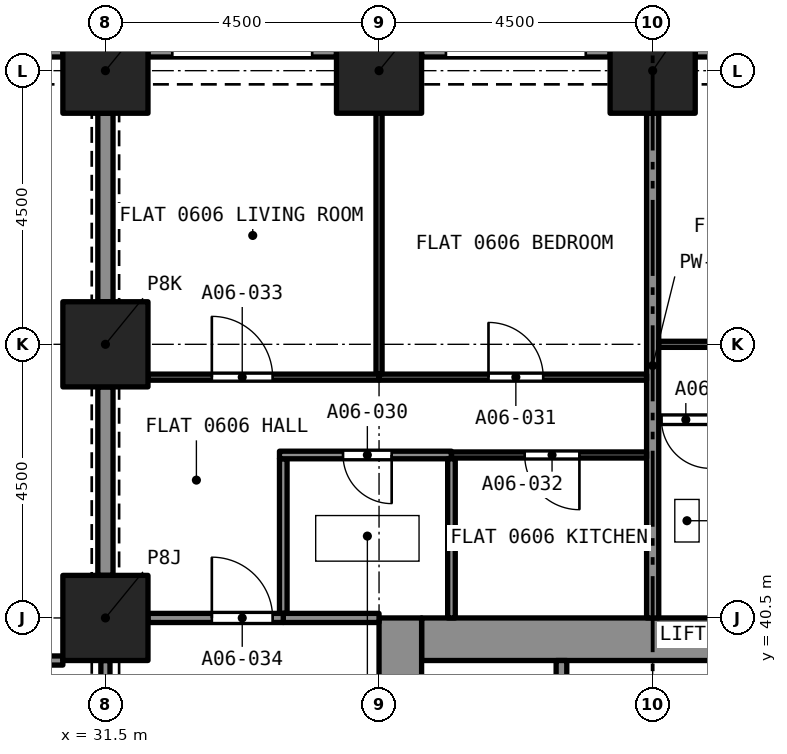
"""IFC4 building model, lengths in metres.
Left out: names, types, materials, properties, quantities, classifications, styles, units other than length and angle.
Written with IfcOpenShell. Run it as: python <this file> out.ifc"""

import sys

from ifc_helpers import new_model, si_unit, direction, frame, frame_2d, origin, origin_2d, place, context, subcontext, project, spatial, rectangle, extrude, element, fill, save


model = new_model("IFC4")
c1 = context("Model", 3, precision=1e-05, world=origin(), true_north=direction((0.0, 1.0)))
c2 = subcontext(c1, "Body", "Model", "MODEL_VIEW")
j1 = project(units=[si_unit("LENGTHUNIT", "METRE"), si_unit("PLANEANGLEUNIT", "RADIAN")], contexts=[c1])
p1 = place(None, origin())
s1 = spatial("IfcSite", under=j1, at=p1, CompositionType="ELEMENT")
p2 = place(p1, origin())
s2 = spatial("IfcBuilding", under=s1, at=p2, CompositionType="ELEMENT")
p3 = place(p2, frame((0.0, 0.0, 30.4)))
s3 = spatial("IfcBuildingStorey", under=s2, at=p3, CompositionType="ELEMENT", Elevation=30.4)
for number, where, z_axis, x_axis in (
    (1, (31.5, 40.5, 0.0), (0.0, 0.0, 1.0), (1.0, 0.0, 0.0)),
    (2, (31.5, 45.0, 0.0), (0.0, 0.0, 1.0), (1.0, 0.0, 0.0)),
    (3, (31.5, 49.5, 0.0), (0.0, 0.0, 1.0), (1.0, 0.0, 0.0)),
    (4, (36.0, 49.5, 0.0), (0.0, 0.0, 1.0), (1.0, 0.0, 0.0)),
    (5, (40.5, 49.5, 0.0), (0.0, 0.0, 1.0), (1.0, 0.0, 0.0)),
):
    element("IfcColumn", number, at=place(p3, frame(where, z_axis=z_axis, x_axis=x_axis)), inside=s3, PredefinedType="COLUMN", context=c2, shape_type="SweptSolid", body=[
        extrude(rectangle(XDim=1.4, YDim=1.4, at=origin_2d()), origin(), (0.0, 0.0, 1.0), 3.2),
    ])
p4 = place(p3, frame((36.7, 40.15, 0.0), z_axis=(0.0, 0.0, 1.0), x_axis=(1.0, 0.0, 0.0)))
e6 = element("IfcWall", 6, at=p4, inside=s3, PredefinedType="SOLIDWALL", context=c2, shape_type="SweptSolid", body=[
    extrude(rectangle(XDim=7.6, YDim=0.7, at=frame_2d((3.8, 0.0))), origin(), (0.0, 0.0, 1.0), 3.2),
])
p5 = place(p3, frame((36.35, 27.0, 0.0), z_axis=(0.0, 0.0, 1.0), x_axis=(0.0, 1.0, 0.0)))
e7 = element("IfcWall", 7, at=p5, inside=s3, PredefinedType="SOLIDWALL", context=c2, shape_type="SweptSolid", body=[
    extrude(rectangle(XDim=13.5, YDim=0.7, at=frame_2d((6.75, 0.0))), origin(), (0.0, 0.0, 1.0), 3.2),
])
p6 = place(p5, frame((8.95, 0.0, 0.0)))
e8 = element("IfcOpeningElement", 8, at=p6, cuts=e7, PredefinedType="OPENING", context=c2, shape_type="SweptSolid", body=[
    extrude(rectangle(XDim=1.2, YDim=2.1, at=frame_2d((0.6, 1.05))), frame((0.0, 0.36, 0.0), z_axis=(0.0, -1.0, 0.0), x_axis=(1.0, 0.0, 0.0)), (0.0, 0.0, 1.0), 0.72),
])
p7 = place(p3, frame((41.2, 49.875, 0.0), z_axis=(0.0, 0.0, 1.0), x_axis=(1.0, 0.0, 0.0)))
e9 = element("IfcWall", 9, at=p7, inside=s3, PredefinedType="SOLIDWALL", context=c2, shape_type="SweptSolid", body=[
    extrude(rectangle(XDim=3.1, YDim=0.3, at=frame_2d((1.55, 0.0))), origin(), (0.0, 0.0, 1.0), 3.2),
])
p8 = place(p7, frame((0.4, 0.0, 0.45)))
e10 = element("IfcOpeningElement", 10, at=p8, cuts=e9, PredefinedType="OPENING", context=c2, shape_type="SweptSolid", body=[
    extrude(rectangle(XDim=2.3, YDim=1.95, at=frame_2d((1.15, 0.975))), frame((0.0, 0.16, 0.0), z_axis=(0.0, -1.0, 0.0), x_axis=(1.0, 0.0, 0.0)), (0.0, 0.0, 1.0), 0.32),
])
p9 = place(p3, frame((36.7, 49.875, 0.0), z_axis=(0.0, 0.0, 1.0), x_axis=(1.0, 0.0, 0.0)))
e11 = element("IfcWall", 11, at=p9, inside=s3, PredefinedType="SOLIDWALL", context=c2, shape_type="SweptSolid", body=[
    extrude(rectangle(XDim=3.1, YDim=0.3, at=frame_2d((1.55, 0.0))), origin(), (0.0, 0.0, 1.0), 3.2),
])
p10 = place(p9, frame((0.4, 0.0, 0.45)))
e12 = element("IfcOpeningElement", 12, at=p10, cuts=e11, PredefinedType="OPENING", context=c2, shape_type="SweptSolid", body=[
    extrude(rectangle(XDim=2.3, YDim=1.95, at=frame_2d((1.15, 0.975))), frame((0.0, 0.16, 0.0), z_axis=(0.0, -1.0, 0.0), x_axis=(1.0, 0.0, 0.0)), (0.0, 0.0, 1.0), 0.32),
])
p11 = place(p3, frame((32.2, 49.875, 0.0), z_axis=(0.0, 0.0, 1.0), x_axis=(1.0, 0.0, 0.0)))
e13 = element("IfcWall", 13, at=p11, inside=s3, PredefinedType="SOLIDWALL", context=c2, shape_type="SweptSolid", body=[
    extrude(rectangle(XDim=3.1, YDim=0.3, at=frame_2d((1.55, 0.0))), origin(), (0.0, 0.0, 1.0), 3.2),
])
p12 = place(p11, frame((0.4, 0.0, 0.45)))
e14 = element("IfcOpeningElement", 14, at=p12, cuts=e13, PredefinedType="OPENING", context=c2, shape_type="SweptSolid", body=[
    extrude(rectangle(XDim=2.3, YDim=1.95, at=frame_2d((1.15, 0.975))), frame((0.0, 0.16, 0.0), z_axis=(0.0, -1.0, 0.0), x_axis=(1.0, 0.0, 0.0)), (0.0, 0.0, 1.0), 0.32),
])
p13 = place(p3, frame((27.7, 49.875, 0.0), z_axis=(0.0, 0.0, 1.0), x_axis=(1.0, 0.0, 0.0)))
e15 = element("IfcWall", 15, at=p13, inside=s3, PredefinedType="SOLIDWALL", context=c2, shape_type="SweptSolid", body=[
    extrude(rectangle(XDim=3.1, YDim=0.3, at=frame_2d((1.55, 0.0))), origin(), (0.0, 0.0, 1.0), 3.2),
])
p14 = place(p13, frame((0.4, 0.0, 0.45)))
e16 = element("IfcOpeningElement", 16, at=p14, cuts=e15, PredefinedType="OPENING", context=c2, shape_type="SweptSolid", body=[
    extrude(rectangle(XDim=2.3, YDim=1.95, at=frame_2d((1.15, 0.975))), frame((0.0, 0.16, 0.0), z_axis=(0.0, -1.0, 0.0), x_axis=(1.0, 0.0, 0.0)), (0.0, 0.0, 1.0), 0.32),
])
p15 = place(p3, frame((41.591, 43.76, 0.0), z_axis=(0.0, 0.0, 1.0), x_axis=(-1.0, 0.0, 0.0)))
e17 = element("IfcWall", 17, at=p15, inside=s3, PredefinedType="PARTITIONING", context=c2, shape_type="SweptSolid", body=[
    extrude(rectangle(XDim=0.991, YDim=0.125, at=frame_2d((0.495, 0.0))), origin(), (0.0, 0.0, 1.0), 2.9),
])
p16 = place(p15, frame((0.146, 0.0, 0.0)))
e18 = element("IfcOpeningElement", 18, at=p16, cuts=e17, PredefinedType="OPENING", context=c2, shape_type="SweptSolid", body=[
    extrude(rectangle(XDim=0.8, YDim=2.1, at=frame_2d((0.4, 1.05))), frame((0.0, 0.073, 0.0), z_axis=(0.0, -1.0, 0.0), x_axis=(1.0, 0.0, 0.0)), (0.0, 0.0, 1.0), 0.145),
])
p17 = place(p3, frame((40.5, 40.5, 0.0), z_axis=(0.0, 0.0, 1.0), x_axis=(0.0, 1.0, 0.0)))
e19 = element("IfcWall", 19, at=p17, inside=s3, PredefinedType="PARTITIONING", context=c2, shape_type="SweptSolid", body=[
    extrude(rectangle(XDim=8.3, YDim=0.2, at=frame_2d((4.15, 0.0))), origin(), (0.0, 0.0, 1.0), 2.9),
])
p18 = place(p3, frame((40.6, 45.0, 0.0), z_axis=(0.0, 0.0, 1.0), x_axis=(1.0, 0.0, 0.0)))
e20 = element("IfcWall", 20, at=p18, inside=s3, PredefinedType="PARTITIONING", context=c2, shape_type="SweptSolid", body=[
    extrude(rectangle(XDim=4.4, YDim=0.1, at=frame_2d((2.2, 0.0))), origin(), (0.0, 0.0, 1.0), 2.9),
])
p19 = place(p18, frame((1.7, 0.0, 0.0)))
e21 = element("IfcOpeningElement", 21, at=p19, cuts=e20, PredefinedType="OPENING", context=c2, shape_type="SweptSolid", body=[
    extrude(rectangle(XDim=0.9, YDim=2.1, at=frame_2d((0.45, 1.05))), frame((0.0, 0.06, 0.0), z_axis=(0.0, -1.0, 0.0), x_axis=(1.0, 0.0, 0.0)), (0.0, 0.0, 1.0), 0.12),
])
p20 = place(p3, frame((34.425, 40.575, 0.0), z_axis=(0.0, 0.0, 1.0), x_axis=(0.0, 1.0, 0.0)))
e22 = element("IfcWall", 22, at=p20, inside=s3, PredefinedType="PARTITIONING", context=c2, shape_type="SweptSolid", body=[
    extrude(rectangle(XDim=2.542, YDim=0.125, at=frame_2d((1.271, 0.0))), origin(), (0.0, 0.0, 1.0), 2.9),
])
p21 = place(p3, frame((37.19, 43.18, 0.0), z_axis=(0.0, 0.0, 1.0), x_axis=(-1.0, 0.0, 0.0)))
e23 = element("IfcWall", 23, at=p21, inside=s3, PredefinedType="PARTITIONING", context=c2, shape_type="SweptSolid", body=[
    extrude(rectangle(XDim=2.828, YDim=0.125, at=frame_2d((1.414, 0.0))), origin(), (0.0, 0.0, 1.0), 2.9),
])
p22 = place(p21, frame((0.983, 0.0, 0.0)))
e24 = element("IfcOpeningElement", 24, at=p22, cuts=e23, PredefinedType="OPENING", context=c2, shape_type="SweptSolid", body=[
    extrude(rectangle(XDim=0.8, YDim=2.1, at=frame_2d((0.4, 1.05))), frame((0.0, 0.073, 0.0), z_axis=(0.0, -1.0, 0.0), x_axis=(1.0, 0.0, 0.0)), (0.0, 0.0, 1.0), 0.145),
])
p23 = place(p3, frame((37.191, 40.5, 0.0), z_axis=(0.0, 0.0, 1.0), x_axis=(0.0, 1.0, 0.0)))
e25 = element("IfcWall", 25, at=p23, inside=s3, PredefinedType="PARTITIONING", context=c2, shape_type="SweptSolid", body=[
    extrude(rectangle(XDim=2.617, YDim=0.125, at=frame_2d((1.309, 0.0))), origin(), (0.0, 0.0, 1.0), 2.9),
])
p24 = place(p3, frame((34.425, 40.5, 0.0), z_axis=(0.0, 0.0, 1.0), x_axis=(1.0, 0.0, 0.0)))
e26 = element("IfcWall", 26, at=p24, inside=s3, PredefinedType="PARTITIONING", context=c2, shape_type="SweptSolid", body=[
    extrude(rectangle(XDim=1.575, YDim=0.15, at=frame_2d((0.788, 0.0))), origin(), (0.0, 0.0, 1.0), 2.9),
])
p25 = place(p3, frame((36.0, 44.46, 0.0), z_axis=(0.0, 0.0, 1.0), x_axis=(1.0, 0.0, 0.0)))
e27 = element("IfcWall", 27, at=p25, inside=s3, PredefinedType="PARTITIONING", context=c2, shape_type="SweptSolid", body=[
    extrude(rectangle(XDim=4.4, YDim=0.1, at=frame_2d((2.2, 0.0))), origin(), (0.0, 0.0, 1.0), 2.9),
])
p26 = place(p25, frame((1.8, 0.0, 0.0)))
e28 = element("IfcOpeningElement", 28, at=p26, cuts=e27, PredefinedType="OPENING", context=c2, shape_type="SweptSolid", body=[
    extrude(rectangle(XDim=0.9, YDim=2.1, at=frame_2d((0.45, 1.05))), frame((0.0, 0.06, 0.0), z_axis=(0.0, -1.0, 0.0), x_axis=(1.0, 0.0, 0.0)), (0.0, 0.0, 1.0), 0.12),
])
p27 = place(p3, frame((36.0, 44.51, 0.0), z_axis=(0.0, 0.0, 1.0), x_axis=(0.0, 1.0, 0.0)))
e29 = element("IfcWall", 29, at=p27, inside=s3, PredefinedType="PARTITIONING", context=c2, shape_type="SweptSolid", body=[
    extrude(rectangle(XDim=4.29, YDim=0.1, at=frame_2d((2.145, 0.0))), origin(), (0.0, 0.0, 1.0), 2.9),
])
p28 = place(p3, frame((40.4, 43.18, 0.0), z_axis=(0.0, 0.0, 1.0), x_axis=(-1.0, 0.0, 0.0)))
e30 = element("IfcWall", 30, at=p28, inside=s3, PredefinedType="PARTITIONING", context=c2, shape_type="SweptSolid", body=[
    extrude(rectangle(XDim=3.209, YDim=0.1, at=frame_2d((1.605, 0.0))), origin(), (0.0, 0.0, 1.0), 2.9),
])
p29 = place(p28, frame((1.105, 0.0, 0.0)))
e31 = element("IfcOpeningElement", 31, at=p29, cuts=e30, PredefinedType="OPENING", context=c2, shape_type="SweptSolid", body=[
    extrude(rectangle(XDim=0.9, YDim=2.1, at=frame_2d((0.45, 1.05))), frame((0.0, 0.06, 0.0), z_axis=(0.0, -1.0, 0.0), x_axis=(1.0, 0.0, 0.0)), (0.0, 0.0, 1.0), 0.12),
])
p30 = place(p3, frame((32.2, 44.46, 0.0), z_axis=(0.0, 0.0, 1.0), x_axis=(1.0, 0.0, 0.0)))
e32 = element("IfcWall", 32, at=p30, inside=s3, PredefinedType="PARTITIONING", context=c2, shape_type="SweptSolid", body=[
    extrude(rectangle(XDim=3.8, YDim=0.1, at=frame_2d((1.9, 0.0))), origin(), (0.0, 0.0, 1.0), 2.9),
])
p31 = place(p30, frame((1.05, 0.0, 0.0)))
e33 = element("IfcOpeningElement", 33, at=p31, cuts=e32, PredefinedType="OPENING", context=c2, shape_type="SweptSolid", body=[
    extrude(rectangle(XDim=1.0, YDim=2.1, at=frame_2d((0.5, 1.05))), frame((0.0, 0.06, 0.0), z_axis=(0.0, -1.0, 0.0), x_axis=(1.0, 0.0, 0.0)), (0.0, 0.0, 1.0), 0.12),
])
p32 = place(p3, frame((31.5, 41.2, 0.0), z_axis=(0.0, 0.0, 1.0), x_axis=(0.0, 1.0, 0.0)))
e34 = element("IfcWall", 34, at=p32, inside=s3, PredefinedType="PARTITIONING", context=c2, shape_type="SweptSolid", body=[
    extrude(rectangle(XDim=3.1, YDim=0.25, at=frame_2d((1.55, 0.0))), origin(), (0.0, 0.0, 1.0), 2.38),
])
p33 = place(p3, frame((32.2, 40.5, 0.0), z_axis=(0.0, 0.0, 1.0), x_axis=(1.0, 0.0, 0.0)))
e35 = element("IfcWall", 35, at=p33, inside=s3, PredefinedType="PARTITIONING", context=c2, shape_type="SweptSolid", body=[
    extrude(rectangle(XDim=2.225, YDim=0.15, at=frame_2d((1.113, 0.0))), origin(), (0.0, 0.0, 1.0), 2.9),
])
p34 = place(p33, frame((1.05, 0.0, 0.0)))
e36 = element("IfcOpeningElement", 36, at=p34, cuts=e35, PredefinedType="OPENING", context=c2, shape_type="SweptSolid", body=[
    extrude(rectangle(XDim=1.0, YDim=2.1, at=frame_2d((0.5, 1.05))), frame((0.0, 0.085, 0.0), z_axis=(0.0, -1.0, 0.0), x_axis=(1.0, 0.0, 0.0)), (0.0, 0.0, 1.0), 0.17),
])
p35 = place(p3, frame((31.5, 45.7, 0.0), z_axis=(0.0, 0.0, 1.0), x_axis=(0.0, 1.0, 0.0)))
e37 = element("IfcWall", 37, at=p35, inside=s3, PredefinedType="PARTITIONING", context=c2, shape_type="SweptSolid", body=[
    extrude(rectangle(XDim=3.1, YDim=0.25, at=frame_2d((1.55, 0.0))), origin(), (0.0, 0.0, 1.0), 2.38),
])
p36 = place(p3, frame((18.7, 39.8, 0.0), z_axis=(0.0, 0.0, 1.0), x_axis=(1.0, 0.0, 0.0)))
e38 = element("IfcWall", 38, at=p36, inside=s3, PredefinedType="PARTITIONING", context=c2, shape_type="SweptSolid", body=[
    extrude(rectangle(XDim=12.1, YDim=0.15, at=frame_2d((6.05, 0.0))), origin(), (0.0, 0.0, 1.0), 2.75),
])
p37 = place(p36, frame((5.55, 0.0, 0.0)))
e39 = element("IfcOpeningElement", 39, at=p37, cuts=e38, PredefinedType="OPENING", context=c2, shape_type="SweptSolid", body=[
    extrude(rectangle(XDim=1.0, YDim=2.1, at=frame_2d((0.5, 1.05))), frame((0.0, 0.085, 0.0), z_axis=(0.0, -1.0, 0.0), x_axis=(1.0, 0.0, 0.0)), (0.0, 0.0, 1.0), 0.17),
])
p38 = place(p3, frame((31.5, 36.7, 0.0), z_axis=(0.0, 0.0, 1.0), x_axis=(0.0, 1.0, 0.0)))
e40 = element("IfcWall", 40, at=p38, inside=s3, PredefinedType="PARTITIONING", context=c2, shape_type="SweptSolid", body=[
    extrude(rectangle(XDim=3.1, YDim=0.15, at=frame_2d((1.55, 0.0))), origin(), (0.0, 0.0, 1.0), 2.38),
])
p39 = place(p38, frame((0.95, 0.0, 0.0)))
e41 = element("IfcOpeningElement", 41, at=p39, cuts=e40, PredefinedType="OPENING", context=c2, shape_type="SweptSolid", body=[
    extrude(rectangle(XDim=1.2, YDim=2.1, at=frame_2d((0.6, 1.05))), frame((0.0, 0.085, 0.0), z_axis=(0.0, -1.0, 0.0), x_axis=(1.0, 0.0, 0.0)), (0.0, 0.0, 1.0), 0.17),
])
p40 = place(p3, frame((39.0, 37.5, 0.0), z_axis=(0.0, 0.0, 1.0), x_axis=(0.0, 1.0, 0.0)))
e42 = element("IfcWall", 42, at=p40, inside=s3, PredefinedType="SOLIDWALL", context=c2, shape_type="SweptSolid", body=[
    extrude(rectangle(XDim=2.3, YDim=0.175, at=frame_2d((1.15, 0.0))), origin(), (0.0, 0.0, 1.0), 2.9),
])
p41 = place(p16, origin())
e43 = element("IfcDoor", 43, at=p41, inside=s3, OperationType="SINGLE_SWING_RIGHT", PredefinedType="DOOR", context=c2, shape_type="SweptSolid", body=[
    extrude(rectangle(XDim=0.8, YDim=2.1, at=frame_2d((0.4, 1.05))), frame((0.0, 0.025, 0.0), z_axis=(0.0, -1.0, 0.0), x_axis=(1.0, 0.0, 0.0)), (0.0, 0.0, 1.0), 0.05),
])
fill(e18, e43)
p42 = place(p22, origin())
e44 = element("IfcDoor", 44, at=p42, inside=s3, OperationType="SINGLE_SWING_LEFT", PredefinedType="DOOR", context=c2, shape_type="SweptSolid", body=[
    extrude(rectangle(XDim=0.8, YDim=2.1, at=frame_2d((0.4, 1.05))), frame((0.0, 0.025, 0.0), z_axis=(0.0, -1.0, 0.0), x_axis=(1.0, 0.0, 0.0)), (0.0, 0.0, 1.0), 0.05),
])
fill(e24, e44)
p43 = place(p26, origin())
e45 = element("IfcDoor", 45, at=p43, inside=s3, OperationType="SINGLE_SWING_RIGHT", PredefinedType="DOOR", context=c2, shape_type="SweptSolid", body=[
    extrude(rectangle(XDim=0.9, YDim=2.1, at=frame_2d((0.45, 1.05))), frame((0.0, 0.025, 0.0), z_axis=(0.0, -1.0, 0.0), x_axis=(1.0, 0.0, 0.0)), (0.0, 0.0, 1.0), 0.05),
])
fill(e28, e45)
p44 = place(p29, origin())
e46 = element("IfcDoor", 46, at=p44, inside=s3, OperationType="SINGLE_SWING_LEFT", PredefinedType="DOOR", context=c2, shape_type="SweptSolid", body=[
    extrude(rectangle(XDim=0.9, YDim=2.1, at=frame_2d((0.45, 1.05))), frame((0.0, 0.025, 0.0), z_axis=(0.0, -1.0, 0.0), x_axis=(1.0, 0.0, 0.0)), (0.0, 0.0, 1.0), 0.05),
])
fill(e31, e46)
p45 = place(p31, origin())
e47 = element("IfcDoor", 47, at=p45, inside=s3, OperationType="SINGLE_SWING_LEFT", PredefinedType="DOOR", context=c2, shape_type="SweptSolid", body=[
    extrude(rectangle(XDim=1.0, YDim=2.1, at=frame_2d((0.5, 1.05))), frame((0.0, 0.025, 0.0), z_axis=(0.0, -1.0, 0.0), x_axis=(1.0, 0.0, 0.0)), (0.0, 0.0, 1.0), 0.05),
])
fill(e33, e47)
p46 = place(p34, origin())
e48 = element("IfcDoor", 48, at=p46, inside=s3, OperationType="SINGLE_SWING_RIGHT", PredefinedType="DOOR", context=c2, shape_type="SweptSolid", body=[
    extrude(rectangle(XDim=1.0, YDim=2.1, at=frame_2d((0.5, 1.05))), frame((0.0, 0.025, 0.0), z_axis=(0.0, -1.0, 0.0), x_axis=(1.0, 0.0, 0.0)), (0.0, 0.0, 1.0), 0.05),
])
fill(e36, e48)
save(model, sys.argv[1])
